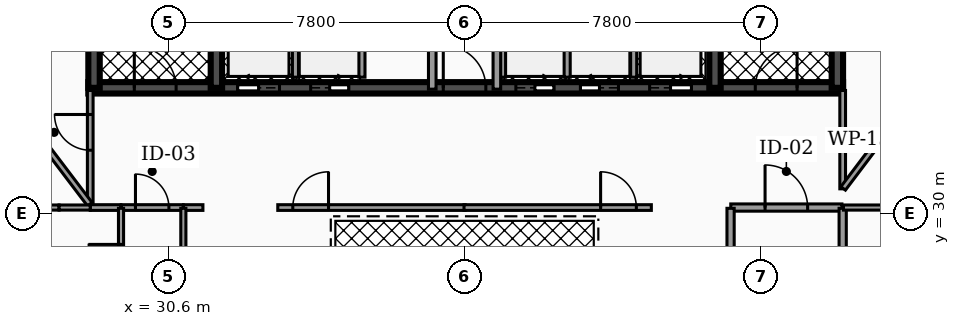
"""IFC4 building model, lengths in metres.
Left out: names, types, materials, properties, quantities, classifications, styles, units other than length and angle.
Written with IfcOpenShell. Run it as: python <this file> out.ifc"""

import sys

from ifc_helpers import new_model, si_unit, direction, frame, frame_2d, origin, place, context, subcontext, project, spatial, rectangle, extrude, element, fill, save


model = new_model("IFC4")
c1 = context("Model", 3, precision=1e-05, world=origin(), true_north=direction((0.0, 1.0)))
c2 = subcontext(c1, "Body", "Model", "MODEL_VIEW")
j1 = project(units=[si_unit("LENGTHUNIT", "METRE"), si_unit("PLANEANGLEUNIT", "RADIAN")], contexts=[c1])
p1 = place(None, origin())
s1 = spatial("IfcSite", under=j1, at=p1, CompositionType="ELEMENT")
p2 = place(p1, origin())
s2 = spatial("IfcBuilding", under=s1, at=p2, CompositionType="ELEMENT")
p3 = place(p2, frame((0.0, 0.0, 272.0)))
s3 = spatial("IfcBuildingStorey", under=s2, at=p3, CompositionType="ELEMENT", Elevation=272.0)
p4 = place(p3, frame((28.5, 33.3, 0.0), z_axis=(0.0, 0.0, 1.0), x_axis=(1.0, 0.0, 0.0)))
e1 = element("IfcWall", 1, at=p4, inside=s3, PredefinedType="SHEAR", context=c2, shape_type="SweptSolid", body=[
    extrude(rectangle(XDim=19.86, YDim=0.3, at=frame_2d((9.93, 0.0))), origin(), (0.0, 0.0, 1.0), 3.18),
])
p5 = place(p4, frame((3.93, 0.0, 0.0)))
e2 = element("IfcOpeningElement", 2, at=p5, cuts=e1, PredefinedType="OPENING", context=c2, shape_type="SweptSolid", body=[
    extrude(rectangle(XDim=1.1, YDim=2.15, at=frame_2d((0.55, 1.075))), frame((0.0, 0.16, 0.0), z_axis=(0.0, -1.0, 0.0), x_axis=(1.0, 0.0, 0.0)), (0.0, 0.0, 1.0), 0.32),
])
p6 = place(p4, frame((14.77, 0.0, 0.0)))
e3 = element("IfcOpeningElement", 3, at=p6, cuts=e1, PredefinedType="OPENING", context=c2, shape_type="SweptSolid", body=[
    extrude(rectangle(XDim=1.1, YDim=2.15, at=frame_2d((0.55, 1.075))), frame((0.0, 0.16, 0.0), z_axis=(0.0, -1.0, 0.0), x_axis=(1.0, 0.0, 0.0)), (0.0, 0.0, 1.0), 0.32),
])
p7 = place(p4, frame((11.25, 0.0, 0.0)))
e4 = element("IfcOpeningElement", 4, at=p7, cuts=e1, PredefinedType="OPENING", context=c2, shape_type="SweptSolid", body=[
    extrude(rectangle(XDim=1.0, YDim=2.1, at=frame_2d((0.5, 1.05))), frame((0.0, 0.16, 0.0), z_axis=(0.0, -1.0, 0.0), x_axis=(1.0, 0.0, 0.0)), (0.0, 0.0, 1.0), 0.32),
])
p8 = place(p4, frame((12.95, 0.0, 0.0)))
e5 = element("IfcOpeningElement", 5, at=p8, cuts=e1, PredefinedType="OPENING", context=c2, shape_type="SweptSolid", body=[
    extrude(rectangle(XDim=1.0, YDim=2.1, at=frame_2d((0.5, 1.05))), frame((0.0, 0.16, 0.0), z_axis=(0.0, -1.0, 0.0), x_axis=(1.0, 0.0, 0.0)), (0.0, 0.0, 1.0), 0.32),
])
p9 = place(p4, frame((5.85, 0.0, 0.0)))
e6 = element("IfcOpeningElement", 6, at=p9, cuts=e1, PredefinedType="OPENING", context=c2, shape_type="SweptSolid", body=[
    extrude(rectangle(XDim=1.0, YDim=2.1, at=frame_2d((0.5, 1.05))), frame((0.0, 0.16, 0.0), z_axis=(0.0, -1.0, 0.0), x_axis=(1.0, 0.0, 0.0)), (0.0, 0.0, 1.0), 0.32),
])
p10 = place(p4, frame((1.21, 0.0, 0.0)))
e7 = element("IfcOpeningElement", 7, at=p10, cuts=e1, PredefinedType="OPENING", context=c2, shape_type="SweptSolid", body=[
    extrude(rectangle(XDim=1.1, YDim=2.2, at=frame_2d((0.55, 1.1))), frame((0.0, 0.16, 0.0), z_axis=(0.0, -1.0, 0.0), x_axis=(1.0, 0.0, 0.0)), (0.0, 0.0, 1.0), 0.32),
])
p11 = place(p4, frame((9.34, 0.0, 0.0)))
e8 = element("IfcOpeningElement", 8, at=p11, cuts=e1, PredefinedType="OPENING", context=c2, shape_type="SweptSolid", body=[
    extrude(rectangle(XDim=1.12, YDim=2.05, at=frame_2d((0.56, 1.025))), frame((0.0, 0.16, 0.0), z_axis=(0.0, -1.0, 0.0), x_axis=(1.0, 0.0, 0.0)), (0.0, 0.0, 1.0), 0.32),
])
p12 = place(p4, frame((17.55, 0.0, 0.0)))
e9 = element("IfcOpeningElement", 9, at=p12, cuts=e1, PredefinedType="OPENING", context=c2, shape_type="SweptSolid", body=[
    extrude(rectangle(XDim=1.1, YDim=2.2, at=frame_2d((0.55, 1.1))), frame((0.0, 0.16, 0.0), z_axis=(0.0, -1.0, 0.0), x_axis=(1.0, 0.0, 0.0)), (0.0, 0.0, 1.0), 0.32),
])
for number, where, z_axis, x_axis in (
    (10, (28.65, 33.3, 0.0), (0.0, 0.0, 1.0), (0.0, 1.0, 0.0)),
    (11, (31.87, 33.3, 0.0), (0.0, 0.0, 1.0), (0.0, 1.0, 0.0)),
    (12, (44.99, 33.3, 0.0), (0.0, 0.0, 1.0), (0.0, 1.0, 0.0)),
    (13, (48.21, 33.3, 0.0), (0.0, 0.0, 1.0), (0.0, 1.0, 0.0)),
):
    element("IfcWall", number, at=place(p3, frame(where, z_axis=z_axis, x_axis=x_axis)), inside=s3, PredefinedType="SHEAR", context=c2, shape_type="SweptSolid", body=[
        extrude(rectangle(XDim=10.1, YDim=0.3, at=frame_2d((5.05, 0.0))), origin(), (0.0, 0.0, 1.0), 3.18),
    ])
for number, where, z_axis, x_axis in (
    (14, (33.95, 33.58, 0.0), (0.0, 0.0, 1.0), (0.0, 1.0, 0.0)),
    (15, (42.85, 33.58, 0.0), (0.0, 0.0, 1.0), (0.0, 1.0, 0.0)),
):
    element("IfcWall", number, at=place(p3, frame(where, z_axis=z_axis, x_axis=x_axis)), inside=s3, PredefinedType="SOLIDWALL", context=c2, shape_type="SweptSolid", body=[
        extrude(rectangle(XDim=2.45, YDim=0.16, at=frame_2d((1.225, 0.0))), origin(), (0.0, 0.0, 1.0), 3.18),
    ])
for number, where, z_axis, x_axis in (
    (16, (39.4, 33.58, 0.0), (0.0, 0.0, 1.0), (0.0, 1.0, 0.0)),
    (17, (41.1, 33.58, 0.0), (0.0, 0.0, 1.0), (0.0, 1.0, 0.0)),
    (18, (35.7, 33.58, 0.0), (0.0, 0.0, 1.0), (0.0, 1.0, 0.0)),
):
    element("IfcWall", number, at=place(p3, frame(where, z_axis=z_axis, x_axis=x_axis)), inside=s3, PredefinedType="SOLIDWALL", context=c2, shape_type="SweptSolid", body=[
        extrude(rectangle(XDim=2.25, YDim=0.16, at=frame_2d((1.125, 0.0))), origin(), (0.0, 0.0, 1.0), 3.18),
    ])
p13 = place(p3, frame((37.55, 33.265, 0.0), z_axis=(0.0, 0.0, 1.0), x_axis=(0.0, 1.0, 0.0)))
e19 = element("IfcWall", 19, at=p13, inside=s3, PredefinedType="PARTITIONING", context=c2, shape_type="SweptSolid", body=[
    extrude(rectangle(XDim=3.615, YDim=0.2, at=frame_2d((1.808, 0.0))), origin(), (0.0, 0.0, 1.0), 2.235),
])
p14 = place(p13, frame((1.367, 0.0, 0.0)))
e20 = element("IfcOpeningElement", 20, at=p14, cuts=e19, PredefinedType="OPENING", context=c2, shape_type="SweptSolid", body=[
    extrude(rectangle(XDim=0.88, YDim=2.05, at=frame_2d((0.44, 1.025))), frame((0.0, 0.11, 0.0), z_axis=(0.0, -1.0, 0.0), x_axis=(1.0, 0.0, 0.0)), (0.0, 0.0, 1.0), 0.22),
])
p15 = place(p3, frame((39.25, 33.265, 0.0), z_axis=(0.0, 0.0, 1.0), x_axis=(0.0, 1.0, 0.0)))
e21 = element("IfcWall", 21, at=p15, inside=s3, PredefinedType="PARTITIONING", context=c2, shape_type="SweptSolid", body=[
    extrude(rectangle(XDim=3.615, YDim=0.2, at=frame_2d((1.808, 0.0))), origin(), (0.0, 0.0, 1.0), 2.235),
])
p16 = place(p3, frame((45.405, 30.15, 0.0), z_axis=(0.0, 0.0, 1.0), x_axis=(1.0, 0.0, 0.0)))
e22 = element("IfcWall", 22, at=p16, inside=s3, PredefinedType="PARTITIONING", context=c2, shape_type="SweptSolid", body=[
    extrude(rectangle(XDim=2.925, YDim=0.19, at=frame_2d((1.462, 0.0))), origin(), (0.0, 0.0, 1.0), 2.235),
])
p17 = place(p16, frame((0.903, 0.0, 0.0)))
e23 = element("IfcOpeningElement", 23, at=p17, cuts=e22, PredefinedType="OPENING", context=c2, shape_type="SweptSolid", body=[
    extrude(rectangle(XDim=1.12, YDim=2.05, at=frame_2d((0.56, 1.025))), frame((0.0, 0.105, 0.0), z_axis=(0.0, -1.0, 0.0), x_axis=(1.0, 0.0, 0.0)), (0.0, 0.0, 1.0), 0.21),
])
p18 = place(p3, frame((28.55, 30.227, 0.0), z_axis=(0.0, 0.0, 1.0), x_axis=(0.0, 1.0, 0.0)))
e24 = element("IfcWall", 24, at=p18, inside=s3, PredefinedType="PARTITIONING", context=c2, shape_type="SweptSolid", body=[
    extrude(rectangle(XDim=3.003, YDim=0.15, at=frame_2d((1.501, 0.0))), origin(), (0.0, 0.0, 1.0), 2.235),
])
p19 = place(p18, frame((1.431, 0.0, 0.0)))
e25 = element("IfcOpeningElement", 25, at=p19, cuts=e24, PredefinedType="OPENING", context=c2, shape_type="SweptSolid", body=[
    extrude(rectangle(XDim=0.94, YDim=2.05, at=frame_2d((0.47, 1.025))), frame((0.0, 0.085, 0.0), z_axis=(0.0, -1.0, 0.0), x_axis=(1.0, 0.0, 0.0)), (0.0, 0.0, 1.0), 0.17),
])
p20 = place(p3, frame((48.35, 30.643, 0.0), z_axis=(0.0, 0.0, 1.0), x_axis=(0.0, 1.0, 0.0)))
e26 = element("IfcWall", 26, at=p20, inside=s3, PredefinedType="PARTITIONING", context=c2, shape_type="SweptSolid", body=[
    extrude(rectangle(XDim=2.587, YDim=0.15, at=frame_2d((1.294, 0.0))), origin(), (0.0, 0.0, 1.0), 2.235),
])
p21 = place(p3, frame((29.365, 30.15, 0.0), z_axis=(0.0, 0.0, 1.0), x_axis=(1.0, 0.0, 0.0)))
e27 = element("IfcWall", 27, at=p21, inside=s3, PredefinedType="PARTITIONING", context=c2, shape_type="SweptSolid", body=[
    extrude(rectangle(XDim=1.63, YDim=0.15, at=frame_2d((0.815, 0.0))), origin(), (0.0, 0.0, 1.0), 2.235),
])
p22 = place(p21, frame((0.375, 0.0, 0.0)))
e28 = element("IfcOpeningElement", 28, at=p22, cuts=e27, PredefinedType="OPENING", context=c2, shape_type="SweptSolid", body=[
    extrude(rectangle(XDim=0.88, YDim=2.05, at=frame_2d((0.44, 1.025))), frame((0.0, 0.085, 0.0), z_axis=(0.0, -1.0, 0.0), x_axis=(1.0, 0.0, 0.0)), (0.0, 0.0, 1.0), 0.17),
])
p23 = place(p3, frame((28.55, 30.15, 0.0), z_axis=(0.0, 0.0, 1.0), x_axis=(1.0, 0.0, 0.0)))
e29 = element("IfcWall", 29, at=p23, inside=s3, PredefinedType="PARTITIONING", context=c2, shape_type="SweptSolid", body=[
    extrude(rectangle(XDim=0.805, YDim=0.15, at=frame_2d((0.402, 0.0))), origin(), (0.0, 0.0, 1.0), 2.235),
])
p24 = place(p3, frame((33.485, 30.15, 0.0), z_axis=(0.0, 0.0, 1.0), x_axis=(1.0, 0.0, 0.0)))
e30 = element("IfcWall", 30, at=p24, inside=s3, PredefinedType="PARTITIONING", context=c2, shape_type="SweptSolid", body=[
    extrude(rectangle(XDim=4.93, YDim=0.15, at=frame_2d((2.465, 0.0))), origin(), (0.0, 0.0, 1.0), 2.235),
])
p25 = place(p24, frame((0.395, 0.0, 0.0)))
e31 = element("IfcOpeningElement", 31, at=p25, cuts=e30, PredefinedType="OPENING", context=c2, shape_type="SweptSolid", body=[
    extrude(rectangle(XDim=0.94, YDim=2.05, at=frame_2d((0.47, 1.025))), frame((0.0, 0.085, 0.0), z_axis=(0.0, -1.0, 0.0), x_axis=(1.0, 0.0, 0.0)), (0.0, 0.0, 1.0), 0.17),
])
p26 = place(p3, frame((31.005, 30.15, 0.0), z_axis=(0.0, 0.0, 1.0), x_axis=(1.0, 0.0, 0.0)))
e32 = element("IfcWall", 32, at=p26, inside=s3, PredefinedType="PARTITIONING", context=c2, shape_type="SweptSolid", body=[
    extrude(rectangle(XDim=0.51, YDim=0.15, at=frame_2d((0.255, 0.0))), origin(), (0.0, 0.0, 1.0), 2.235),
])
p27 = place(p3, frame((38.385, 30.15, 0.0), z_axis=(0.0, 0.0, 1.0), x_axis=(1.0, 0.0, 0.0)))
e33 = element("IfcWall", 33, at=p27, inside=s3, PredefinedType="PARTITIONING", context=c2, shape_type="SweptSolid", body=[
    extrude(rectangle(XDim=4.93, YDim=0.15, at=frame_2d((2.465, 0.0))), origin(), (0.0, 0.0, 1.0), 2.235),
])
p28 = place(p27, frame((3.595, 0.0, 0.0)))
e34 = element("IfcOpeningElement", 34, at=p28, cuts=e33, PredefinedType="OPENING", context=c2, shape_type="SweptSolid", body=[
    extrude(rectangle(XDim=0.94, YDim=2.05, at=frame_2d((0.47, 1.025))), frame((0.0, 0.085, 0.0), z_axis=(0.0, -1.0, 0.0), x_axis=(1.0, 0.0, 0.0)), (0.0, 0.0, 1.0), 0.17),
])
for number, where, z_axis, x_axis in (
    (35, (45.4, 27.37, 0.0), (0.0, 0.0, 1.0), (0.0, 1.0, 0.0)),
    (36, (48.35, 27.37, 0.0), (0.0, 0.0, 1.0), (0.0, 1.0, 0.0)),
):
    element("IfcWall", number, at=place(p3, frame(where, z_axis=z_axis, x_axis=x_axis)), inside=s3, PredefinedType="PARTITIONING", context=c2, shape_type="SweptSolid", body=[
        extrude(rectangle(XDim=2.76, YDim=0.19, at=frame_2d((1.38, 0.0))), origin(), (0.0, 0.0, 1.0), 2.235),
    ])
p29 = place(p3, frame((26.562, 32.84, 0.0), z_axis=(0.0, 0.0, 1.0), x_axis=(0.604783852999, -0.796389660375, 0.0)))
e37 = element("IfcWall", 37, at=p29, inside=s3, PredefinedType="PARTITIONING", context=c2, shape_type="SweptSolid", body=[
    extrude(rectangle(XDim=3.267, YDim=0.15, at=frame_2d((1.634, 0.0))), origin(), (0.0, 0.0, 1.0), 2.235),
])
p30 = place(p3, frame((48.362, 30.654, 0.0), z_axis=(0.0, 0.0, 1.0), x_axis=(0.603189668488, 0.79759778324, 0.0)))
e38 = element("IfcWall", 38, at=p30, inside=s3, PredefinedType="PARTITIONING", context=c2, shape_type="SweptSolid", body=[
    extrude(rectangle(XDim=2.886, YDim=0.15, at=frame_2d((1.443, 0.0))), origin(), (0.0, 0.0, 1.0), 2.235),
])
p31 = place(p3, frame((29.36, 27.37, 0.0), z_axis=(0.0, 0.0, 1.0), x_axis=(0.0, 1.0, 0.0)))
e39 = element("IfcWall", 39, at=p31, inside=s3, PredefinedType="PARTITIONING", context=c2, shape_type="SweptSolid", body=[
    extrude(rectangle(XDim=2.76, YDim=0.135, at=frame_2d((1.38, 0.0))), origin(), (0.0, 0.0, 1.0), 2.235),
])
p32 = place(p31, frame((0.95, 0.0, 0.0)))
e40 = element("IfcOpeningElement", 40, at=p32, cuts=e39, PredefinedType="OPENING", context=c2, shape_type="SweptSolid", body=[
    extrude(rectangle(XDim=0.86, YDim=2.05, at=frame_2d((0.43, 1.025))), frame((0.0, 0.077, 0.0), z_axis=(0.0, -1.0, 0.0), x_axis=(1.0, 0.0, 0.0)), (0.0, 0.0, 1.0), 0.155),
])
p33 = place(p3, frame((31.0, 27.37, 0.0), z_axis=(0.0, 0.0, 1.0), x_axis=(0.0, 1.0, 0.0)))
e41 = element("IfcWall", 41, at=p33, inside=s3, PredefinedType="PARTITIONING", context=c2, shape_type="SweptSolid", body=[
    extrude(rectangle(XDim=2.76, YDim=0.135, at=frame_2d((1.38, 0.0))), origin(), (0.0, 0.0, 1.0), 2.235),
])
p34 = place(p3, frame((26.12, 30.15, 0.0), z_axis=(0.0, 0.0, 1.0), x_axis=(1.0, 0.0, 0.0)))
e42 = element("IfcWall", 42, at=p34, inside=s3, PredefinedType="PARTITIONING", context=c2, shape_type="SweptSolid", body=[
    extrude(rectangle(XDim=1.61, YDim=0.135, at=frame_2d((0.805, 0.0))), origin(), (0.0, 0.0, 1.0), 2.235),
])
p35 = place(p3, frame((27.73, 30.15, 0.0), z_axis=(0.0, 0.0, 1.0), x_axis=(1.0, 0.0, 0.0)))
e43 = element("IfcWall", 43, at=p35, inside=s3, PredefinedType="PARTITIONING", context=c2, shape_type="SweptSolid", body=[
    extrude(rectangle(XDim=0.82, YDim=0.135, at=frame_2d((0.41, 0.0))), origin(), (0.0, 0.0, 1.0), 2.235),
])
p36 = place(p3, frame((48.37, 30.15, 0.0), z_axis=(0.0, 0.0, 1.0), x_axis=(1.0, 0.0, 0.0)))
e44 = element("IfcWall", 44, at=p36, inside=s3, PredefinedType="PARTITIONING", context=c2, shape_type="SweptSolid", body=[
    extrude(rectangle(XDim=2.68, YDim=0.135, at=frame_2d((1.34, 0.0))), origin(), (0.0, 0.0, 1.0), 2.235),
])
p37 = place(p5, origin())
e45 = element("IfcDoor", 45, at=p37, inside=s3, OperationType="SLIDING_TO_LEFT", PredefinedType="DOOR", context=c2, shape_type="SweptSolid", body=[
    extrude(rectangle(XDim=1.1, YDim=2.15, at=frame_2d((0.55, 1.075))), frame((0.0, 0.025, 0.0), z_axis=(0.0, -1.0, 0.0), x_axis=(1.0, 0.0, 0.0)), (0.0, 0.0, 1.0), 0.05),
])
fill(e2, e45)
p38 = place(p6, origin())
e46 = element("IfcDoor", 46, at=p38, inside=s3, OperationType="SLIDING_TO_RIGHT", PredefinedType="DOOR", context=c2, shape_type="SweptSolid", body=[
    extrude(rectangle(XDim=1.1, YDim=2.15, at=frame_2d((0.55, 1.075))), frame((0.0, 0.025, 0.0), z_axis=(0.0, -1.0, 0.0), x_axis=(1.0, 0.0, 0.0)), (0.0, 0.0, 1.0), 0.05),
])
fill(e3, e46)
p39 = place(p7, origin())
e47 = element("IfcDoor", 47, at=p39, inside=s3, OperationType="SLIDING_TO_RIGHT", PredefinedType="DOOR", context=c2, shape_type="SweptSolid", body=[
    extrude(rectangle(XDim=1.0, YDim=2.1, at=frame_2d((0.5, 1.05))), frame((0.0, 0.025, 0.0), z_axis=(0.0, -1.0, 0.0), x_axis=(1.0, 0.0, 0.0)), (0.0, 0.0, 1.0), 0.05),
])
fill(e4, e47)
p40 = place(p8, origin())
e48 = element("IfcDoor", 48, at=p40, inside=s3, OperationType="SLIDING_TO_LEFT", PredefinedType="DOOR", context=c2, shape_type="SweptSolid", body=[
    extrude(rectangle(XDim=1.0, YDim=2.1, at=frame_2d((0.5, 1.05))), frame((0.0, 0.025, 0.0), z_axis=(0.0, -1.0, 0.0), x_axis=(1.0, 0.0, 0.0)), (0.0, 0.0, 1.0), 0.05),
])
fill(e5, e48)
p41 = place(p9, origin())
e49 = element("IfcDoor", 49, at=p41, inside=s3, OperationType="SLIDING_TO_RIGHT", PredefinedType="DOOR", context=c2, shape_type="SweptSolid", body=[
    extrude(rectangle(XDim=1.0, YDim=2.1, at=frame_2d((0.5, 1.05))), frame((0.0, 0.025, 0.0), z_axis=(0.0, -1.0, 0.0), x_axis=(1.0, 0.0, 0.0)), (0.0, 0.0, 1.0), 0.05),
])
fill(e6, e49)
p42 = place(p10, origin())
e50 = element("IfcDoor", 50, at=p42, inside=s3, OperationType="SINGLE_SWING_LEFT", PredefinedType="DOOR", context=c2, shape_type="SweptSolid", body=[
    extrude(rectangle(XDim=1.1, YDim=2.2, at=frame_2d((0.55, 1.1))), frame((0.0, 0.025, 0.0), z_axis=(0.0, -1.0, 0.0), x_axis=(1.0, 0.0, 0.0)), (0.0, 0.0, 1.0), 0.05),
])
fill(e7, e50)
p43 = place(p11, origin())
e51 = element("IfcDoor", 51, at=p43, inside=s3, OperationType="SINGLE_SWING_LEFT", PredefinedType="DOOR", context=c2, shape_type="SweptSolid", body=[
    extrude(rectangle(XDim=1.12, YDim=2.05, at=frame_2d((0.56, 1.025))), frame((0.0, 0.025, 0.0), z_axis=(0.0, -1.0, 0.0), x_axis=(1.0, 0.0, 0.0)), (0.0, 0.0, 1.0), 0.05),
])
fill(e8, e51)
p44 = place(p12, origin())
e52 = element("IfcDoor", 52, at=p44, inside=s3, OperationType="SINGLE_SWING_RIGHT", PredefinedType="DOOR", context=c2, shape_type="SweptSolid", body=[
    extrude(rectangle(XDim=1.1, YDim=2.2, at=frame_2d((0.55, 1.1))), frame((0.0, 0.025, 0.0), z_axis=(0.0, -1.0, 0.0), x_axis=(1.0, 0.0, 0.0)), (0.0, 0.0, 1.0), 0.05),
])
fill(e9, e52)
p45 = place(p17, origin())
e53 = element("IfcDoor", 53, at=p45, inside=s3, OperationType="SINGLE_SWING_LEFT", PredefinedType="DOOR", context=c2, shape_type="SweptSolid", body=[
    extrude(rectangle(XDim=1.12, YDim=2.05, at=frame_2d((0.56, 1.025))), frame((0.0, 0.025, 0.0), z_axis=(0.0, -1.0, 0.0), x_axis=(1.0, 0.0, 0.0)), (0.0, 0.0, 1.0), 0.05),
])
fill(e23, e53)
p46 = place(p19, origin())
e54 = element("IfcDoor", 54, at=p46, inside=s3, OperationType="SINGLE_SWING_RIGHT", PredefinedType="DOOR", context=c2, shape_type="SweptSolid", body=[
    extrude(rectangle(XDim=0.94, YDim=2.05, at=frame_2d((0.47, 1.025))), frame((0.0, 0.025, 0.0), z_axis=(0.0, -1.0, 0.0), x_axis=(1.0, 0.0, 0.0)), (0.0, 0.0, 1.0), 0.05),
])
fill(e25, e54)
p47 = place(p22, origin())
e55 = element("IfcDoor", 55, at=p47, inside=s3, OperationType="SINGLE_SWING_LEFT", PredefinedType="DOOR", context=c2, shape_type="SweptSolid", body=[
    extrude(rectangle(XDim=0.88, YDim=2.05, at=frame_2d((0.44, 1.025))), frame((0.0, 0.025, 0.0), z_axis=(0.0, -1.0, 0.0), x_axis=(1.0, 0.0, 0.0)), (0.0, 0.0, 1.0), 0.05),
])
fill(e28, e55)
p48 = place(p25, origin())
e56 = element("IfcDoor", 56, at=p48, inside=s3, OperationType="SINGLE_SWING_RIGHT", PredefinedType="DOOR", context=c2, shape_type="SweptSolid", body=[
    extrude(rectangle(XDim=0.94, YDim=2.05, at=frame_2d((0.47, 1.025))), frame((0.0, 0.025, 0.0), z_axis=(0.0, -1.0, 0.0), x_axis=(1.0, 0.0, 0.0)), (0.0, 0.0, 1.0), 0.05),
])
fill(e31, e56)
p49 = place(p28, origin())
e57 = element("IfcDoor", 57, at=p49, inside=s3, OperationType="SINGLE_SWING_LEFT", PredefinedType="DOOR", context=c2, shape_type="SweptSolid", body=[
    extrude(rectangle(XDim=0.94, YDim=2.05, at=frame_2d((0.47, 1.025))), frame((0.0, 0.025, 0.0), z_axis=(0.0, -1.0, 0.0), x_axis=(1.0, 0.0, 0.0)), (0.0, 0.0, 1.0), 0.05),
])
fill(e34, e57)
p50 = place(p32, origin())
e58 = element("IfcDoor", 58, at=p50, inside=s3, OperationType="SINGLE_SWING_RIGHT", PredefinedType="DOOR", context=c2, shape_type="SweptSolid", body=[
    extrude(rectangle(XDim=0.86, YDim=2.05, at=frame_2d((0.43, 1.025))), frame((0.0, 0.025, 0.0), z_axis=(0.0, -1.0, 0.0), x_axis=(1.0, 0.0, 0.0)), (0.0, 0.0, 1.0), 0.05),
])
fill(e40, e58)
save(model, sys.argv[1])
